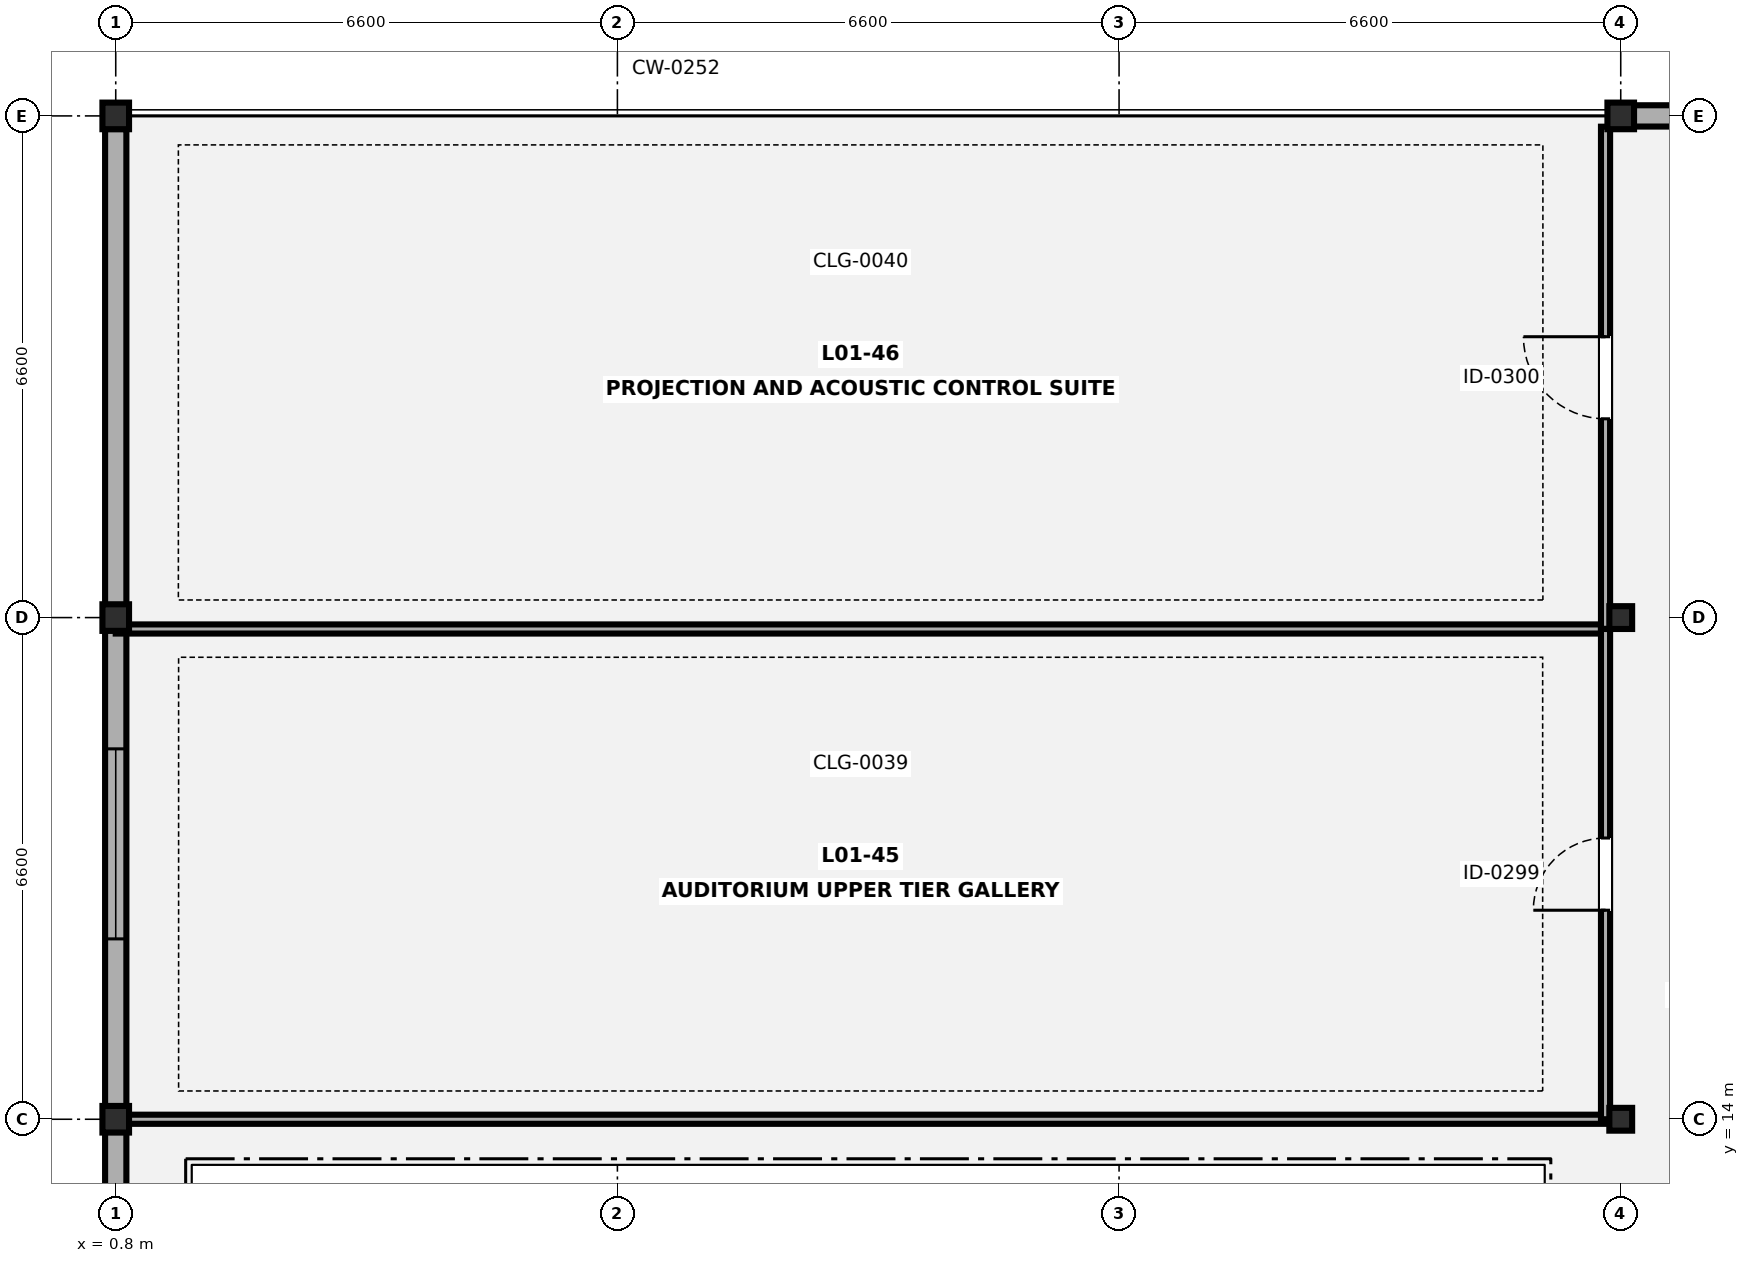
"""IFC4 building model, lengths in metres.
Left out: names, types, materials, properties, quantities, classifications, styles, units other than length and angle.
Written with IfcOpenShell. Run it as: python <this file> out.ifc"""

import sys

from ifc_helpers import new_model, si_unit, direction, frame, frame_2d, origin, origin_2d, place, context, subcontext, project, spatial, rectangle, hollow_rectangle, i_section, extrude, element, fill, save


model = new_model("IFC4")
c1 = context("Model", 3, precision=1e-05, world=origin(), true_north=direction((0.0, 1.0)))
c2 = subcontext(c1, "Body", "Model", "MODEL_VIEW")
j1 = project(units=[si_unit("LENGTHUNIT", "METRE"), si_unit("PLANEANGLEUNIT", "RADIAN")], contexts=[c1])
p1 = place(None, origin())
s1 = spatial("IfcSite", under=j1, at=p1, CompositionType="ELEMENT")
p2 = place(p1, origin())
s2 = spatial("IfcBuilding", under=s1, at=p2, CompositionType="ELEMENT")
p3 = place(p2, frame((0.0, 0.0, 4.9)))
s3 = spatial("IfcBuildingStorey", under=s2, at=p3, CompositionType="ELEMENT", Elevation=4.9)
for number, where, z_axis, x_axis in (
    (1, (0.8, 14.0, 0.0), (0.0, 0.0, 1.0), (1.0, 0.0, 0.0)),
    (2, (0.8, 20.6, 0.0), (0.0, 0.0, 1.0), (1.0, 0.0, 0.0)),
    (3, (0.8, 27.2, 0.0), (0.0, 0.0, 1.0), (1.0, 0.0, 0.0)),
):
    element("IfcColumn", number, at=place(p3, frame(where, z_axis=z_axis, x_axis=x_axis)), inside=s3, PredefinedType="COLUMN", context=c2, shape_type="SweptSolid", body=[
        extrude(i_section(OverallWidth=0.35, OverallDepth=0.35, WebThickness=0.02, FlangeThickness=0.032, FilletRadius=0.016, at=origin_2d()), origin(), (0.0, 0.0, 1.0), 4.2),
    ])
for number, where, z_axis, x_axis in (
    (4, (20.6, 14.0, 0.0), (0.0, 0.0, 1.0), (1.0, 0.0, 0.0)),
    (5, (20.6, 20.6, 0.0), (0.0, 0.0, 1.0), (1.0, 0.0, 0.0)),
):
    element("IfcColumn", number, at=place(p3, frame(where, z_axis=z_axis, x_axis=x_axis)), inside=s3, PredefinedType="COLUMN", context=c2, shape_type="SweptSolid", body=[
        extrude(hollow_rectangle(XDim=0.3, YDim=0.3, WallThickness=0.012, at=origin_2d()), origin(), (0.0, 0.0, 1.0), 4.2),
    ])
p4 = place(p3, frame((20.6, 27.2, 0.0), z_axis=(0.0, 0.0, 1.0), x_axis=(1.0, 0.0, 0.0)))
e6 = element("IfcColumn", 6, at=p4, inside=s3, PredefinedType="COLUMN", context=c2, shape_type="SweptSolid", body=[
    extrude(i_section(OverallWidth=0.35, OverallDepth=0.35, WebThickness=0.02, FlangeThickness=0.032, FilletRadius=0.016, at=origin_2d()), origin(), (0.0, 0.0, 1.0), 4.2),
])
p5 = place(p3, frame((0.8, 0.973, 0.0), z_axis=(0.0, 0.0, 1.0), x_axis=(0.0, 1.0, 0.0)))
e7 = element("IfcWall", 7, at=p5, inside=s3, PredefinedType="SOLIDWALL", context=c2, shape_type="SweptSolid", body=[
    extrude(rectangle(XDim=26.054, YDim=0.28, at=frame_2d((13.027, 0.0))), origin(), (0.0, 0.0, 1.0), 3.445),
])
p6 = place(p5, frame((2.3, 0.0, 0.85)))
e8 = element("IfcOpeningElement", 8, at=p6, cuts=e7, PredefinedType="OPENING", context=c2, shape_type="SweptSolid", body=[
    extrude(rectangle(XDim=1.45, YDim=1.25, at=frame_2d((0.725, 0.625))), frame((0.0, 0.15, 0.0), z_axis=(0.0, -1.0, 0.0), x_axis=(1.0, 0.0, 0.0)), (0.0, 0.0, 1.0), 0.3),
])
p7 = place(p5, frame((15.4, 0.0, 0.85)))
e9 = element("IfcOpeningElement", 9, at=p7, cuts=e7, PredefinedType="OPENING", context=c2, shape_type="SweptSolid", body=[
    extrude(rectangle(XDim=2.5, YDim=1.25, at=frame_2d((1.25, 0.625))), frame((0.0, 0.15, 0.0), z_axis=(0.0, -1.0, 0.0), x_axis=(1.0, 0.0, 0.0)), (0.0, 0.0, 1.0), 0.3),
])
p8 = place(p3, frame((20.773, 27.2, 0.0), z_axis=(0.0, 0.0, 1.0), x_axis=(1.0, 0.0, 0.0)))
e10 = element("IfcWall", 10, at=p8, inside=s3, PredefinedType="SOLIDWALL", context=c2, shape_type="SweptSolid", body=[
    extrude(rectangle(XDim=6.254, YDim=0.28, at=frame_2d((3.127, 0.0))), origin(), (0.0, 0.0, 1.0), 3.505),
])
p9 = place(p8, frame((2.0, 0.0, 0.85)))
e11 = element("IfcOpeningElement", 11, at=p9, cuts=e10, PredefinedType="OPENING", context=c2, shape_type="SweptSolid", body=[
    extrude(rectangle(XDim=1.25, YDim=1.4, at=frame_2d((0.625, 0.7))), frame((0.0, 0.15, 0.0), z_axis=(0.0, -1.0, 0.0), x_axis=(1.0, 0.0, 0.0)), (0.0, 0.0, 1.0), 0.3),
])
for number, where, z_axis, x_axis in (
    (12, (0.8, 14.0, 0.0), (0.0, 0.0, 1.0), (1.0, 0.0, 0.0)),
    (13, (0.8, 20.45, 0.0), (0.0, 0.0, 1.0), (1.0, 0.0, 0.0)),
):
    element("IfcWall", number, at=place(p3, frame(where, z_axis=z_axis, x_axis=x_axis)), inside=s3, PredefinedType="PARTITIONING", context=c2, shape_type="SweptSolid", body=[
        extrude(rectangle(XDim=19.6, YDim=0.12, at=frame_2d((9.8, 0.0))), origin(), (0.0, 0.0, 1.0), 2.997),
    ])
p10 = place(p3, frame((20.4, 14.0, 0.0), z_axis=(0.0, 0.0, 1.0), x_axis=(0.0, 1.0, 0.0)))
e14 = element("IfcWall", 14, at=p10, inside=s3, PredefinedType="PARTITIONING", context=c2, shape_type="SweptSolid", body=[
    extrude(rectangle(XDim=6.45, YDim=0.12, at=frame_2d((3.225, 0.0))), origin(), (0.0, 0.0, 1.0), 3.445),
])
p11 = place(p10, frame((2.75, 0.0, 0.0)))
e15 = element("IfcOpeningElement", 15, at=p11, cuts=e14, PredefinedType="OPENING", context=c2, shape_type="SweptSolid", body=[
    extrude(rectangle(XDim=0.95, YDim=2.1, at=frame_2d((0.475, 1.05))), frame((0.0, 0.07, 0.0), z_axis=(0.0, -1.0, 0.0), x_axis=(1.0, 0.0, 0.0)), (0.0, 0.0, 1.0), 0.14),
])
p12 = place(p3, frame((20.4, 20.452, 0.0), z_axis=(0.0, 0.0, 1.0), x_axis=(0.0, 1.0, 0.0)))
e16 = element("IfcWall", 16, at=p12, inside=s3, PredefinedType="PARTITIONING", context=c2, shape_type="SweptSolid", body=[
    extrude(rectangle(XDim=6.606, YDim=0.12, at=frame_2d((3.303, 0.0))), origin(), (0.0, 0.0, 1.0), 3.445),
])
p13 = place(p12, frame((2.763, 0.0, 0.0)))
e17 = element("IfcOpeningElement", 17, at=p13, cuts=e16, PredefinedType="OPENING", context=c2, shape_type="SweptSolid", body=[
    extrude(rectangle(XDim=1.08, YDim=2.12, at=frame_2d((0.54, 1.06))), frame((0.0, 0.07, 0.0), z_axis=(0.0, -1.0, 0.0), x_axis=(1.0, 0.0, 0.0)), (0.0, 0.0, 1.0), 0.14),
])
p14 = place(p7, origin())
e18 = element("IfcWindow", 18, at=p14, inside=s3, PartitioningType="SINGLE_PANEL", PredefinedType="WINDOW", context=c2, shape_type="SweptSolid", body=[
    extrude(rectangle(XDim=2.5, YDim=1.25, at=frame_2d((1.25, 0.625))), frame((0.0, 0.03, 0.0), z_axis=(0.0, -1.0, 0.0), x_axis=(1.0, 0.0, 0.0)), (0.0, 0.0, 1.0), 0.06),
])
fill(e9, e18)
p15 = place(p11, origin())
e19 = element("IfcDoor", 19, at=p15, inside=s3, OperationType="SINGLE_SWING_LEFT", PredefinedType="DOOR", context=c2, shape_type="SweptSolid", body=[
    extrude(rectangle(XDim=0.95, YDim=2.1, at=frame_2d((0.475, 1.05))), frame((0.0, 0.025, 0.0), z_axis=(0.0, -1.0, 0.0), x_axis=(1.0, 0.0, 0.0)), (0.0, 0.0, 1.0), 0.05),
])
fill(e15, e19)
p16 = place(p13, origin())
e20 = element("IfcDoor", 20, at=p16, inside=s3, OperationType="SINGLE_SWING_RIGHT", PredefinedType="DOOR", context=c2, shape_type="SweptSolid", body=[
    extrude(rectangle(XDim=1.08, YDim=2.12, at=frame_2d((0.54, 1.06))), frame((0.0, 0.025, 0.0), z_axis=(0.0, -1.0, 0.0), x_axis=(1.0, 0.0, 0.0)), (0.0, 0.0, 1.0), 0.05),
])
fill(e17, e20)
save(model, sys.argv[1])
